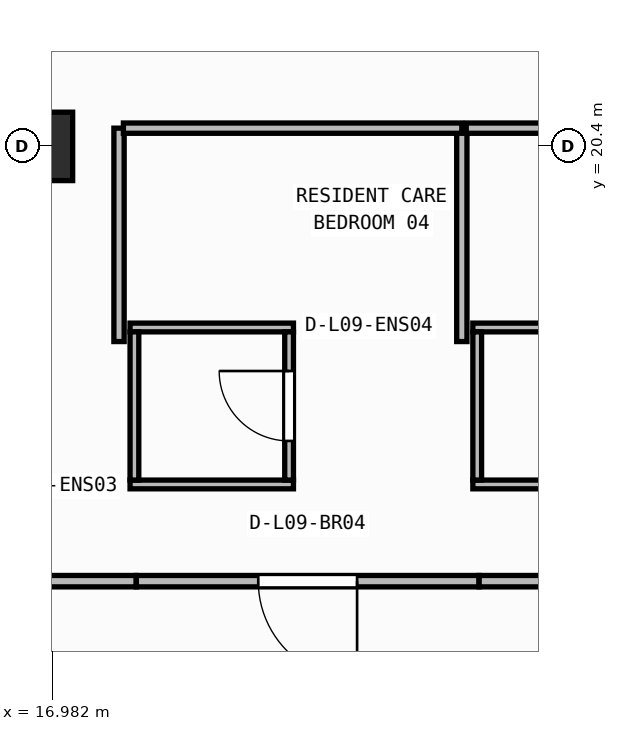
"""IFC4 building model, lengths in metres.
Left out: names, types, materials, properties, quantities, classifications, styles, units other than length and angle.
Written with IfcOpenShell. Run it as: python <this file> out.ifc"""

import sys

from ifc_helpers import new_model, si_unit, direction, frame, frame_2d, origin, origin_2d, place, context, subcontext, project, spatial, rectangle, extrude, element, fill, save


model = new_model("IFC4")
c1 = context("Model", 3, precision=1e-05, world=origin(), true_north=direction((0.0, 1.0)))
c2 = subcontext(c1, "Body", "Model", "MODEL_VIEW")
j1 = project(units=[si_unit("LENGTHUNIT", "METRE"), si_unit("PLANEANGLEUNIT", "RADIAN")], contexts=[c1])
p1 = place(None, origin())
s1 = spatial("IfcSite", under=j1, at=p1, CompositionType="ELEMENT")
p2 = place(p1, origin())
s2 = spatial("IfcBuilding", under=s1, at=p2, CompositionType="ELEMENT")
p3 = place(p2, frame((0.0, 0.0, 38.3)))
s3 = spatial("IfcBuildingStorey", under=s2, at=p3, CompositionType="ELEMENT", Elevation=38.3)
p4 = place(p3, frame((16.8, 20.4, 0.0), z_axis=(0.0, 0.0, 1.0), x_axis=(1.0, 0.0, 0.0)))
e1 = element("IfcColumn", 1, at=p4, inside=s3, PredefinedType="COLUMN", context=c2, shape_type="SweptSolid", body=[
    extrude(rectangle(XDim=0.9, YDim=0.9, at=origin_2d()), origin(), (0.0, 0.0, 1.0), 3.95),
])
for number, where, z_axis, x_axis in (
    (2, (18.005, 15.952, 0.0), (0.0, 0.0, 1.0), (1.0, 0.0, 0.0)),
    (3, (18.005, 18.018, 0.0), (0.0, 0.0, 1.0), (1.0, 0.0, 0.0)),
):
    element("IfcWall", number, at=place(p3, frame(where, z_axis=z_axis, x_axis=x_axis)), inside=s3, PredefinedType="PARTITIONING", context=c2, shape_type="SweptSolid", body=[
        extrude(rectangle(XDim=2.15, YDim=0.115, at=frame_2d((1.075, 0.0))), origin(), (0.0, 0.0, 1.0), 3.71),
    ])
p5 = place(p3, frame((18.062, 16.01, 0.0), z_axis=(0.0, 0.0, 1.0), x_axis=(0.0, 1.0, 0.0)))
e4 = element("IfcWall", 4, at=p5, inside=s3, PredefinedType="PARTITIONING", context=c2, shape_type="SweptSolid", body=[
    extrude(rectangle(XDim=1.95, YDim=0.115, at=frame_2d((0.975, 0.0))), origin(), (0.0, 0.0, 1.0), 3.71),
])
p6 = place(p3, frame((20.097, 16.01, 0.0), z_axis=(0.0, 0.0, 1.0), x_axis=(0.0, 1.0, 0.0)))
e5 = element("IfcWall", 5, at=p6, inside=s3, PredefinedType="PARTITIONING", context=c2, shape_type="SweptSolid", body=[
    extrude(rectangle(XDim=1.95, YDim=0.115, at=frame_2d((0.975, 0.0))), origin(), (0.0, 0.0, 1.0), 3.71),
])
p7 = place(p6, frame((0.515, 0.0, 0.0)))
e6 = element("IfcOpeningElement", 6, at=p7, cuts=e5, PredefinedType="OPENING", context=c2, shape_type="SweptSolid", body=[
    extrude(rectangle(XDim=0.92, YDim=2.1, at=frame_2d((0.46, 1.05))), frame((0.0, 0.067, 0.0), z_axis=(0.0, -1.0, 0.0), x_axis=(1.0, 0.0, 0.0)), (0.0, 0.0, 1.0), 0.135),
])
for number, where, z_axis, x_axis in (
    (7, (22.515, 15.952, 0.0), (0.0, 0.0, 1.0), (1.0, 0.0, 0.0)),
    (8, (22.515, 18.018, 0.0), (0.0, 0.0, 1.0), (1.0, 0.0, 0.0)),
):
    element("IfcWall", number, at=place(p3, frame(where, z_axis=z_axis, x_axis=x_axis)), inside=s3, PredefinedType="PARTITIONING", context=c2, shape_type="SweptSolid", body=[
        extrude(rectangle(XDim=2.15, YDim=0.115, at=frame_2d((1.075, 0.0))), origin(), (0.0, 0.0, 1.0), 3.71),
    ])
p8 = place(p3, frame((22.573, 16.01, 0.0), z_axis=(0.0, 0.0, 1.0), x_axis=(0.0, 1.0, 0.0)))
e9 = element("IfcWall", 9, at=p8, inside=s3, PredefinedType="PARTITIONING", context=c2, shape_type="SweptSolid", body=[
    extrude(rectangle(XDim=1.95, YDim=0.115, at=frame_2d((0.975, 0.0))), origin(), (0.0, 0.0, 1.0), 3.71),
])
p9 = place(p3, frame((18.086, 14.68, 0.0), z_axis=(0.0, 0.0, 1.0), x_axis=(-1.0, 0.0, 0.0)))
e10 = element("IfcWall", 10, at=p9, inside=s3, PredefinedType="PARTITIONING", context=c2, shape_type="SweptSolid", body=[
    extrude(rectangle(XDim=4.148, YDim=0.15, at=frame_2d((2.074, 0.0))), origin(), (0.0, 0.0, 1.0), 3.71),
])
p10 = place(p9, frame((1.424, 0.0, 0.0)))
e11 = element("IfcOpeningElement", 11, at=p10, cuts=e10, PredefinedType="OPENING", context=c2, shape_type="SweptSolid", body=[
    extrude(rectangle(XDim=1.3, YDim=2.15, at=frame_2d((0.65, 1.075))), frame((0.0, 0.085, 0.0), z_axis=(0.0, -1.0, 0.0), x_axis=(1.0, 0.0, 0.0)), (0.0, 0.0, 1.0), 0.17),
])
p11 = place(p3, frame((22.596, 14.68, 0.0), z_axis=(0.0, 0.0, 1.0), x_axis=(-1.0, 0.0, 0.0)))
e12 = element("IfcWall", 12, at=p11, inside=s3, PredefinedType="PARTITIONING", context=c2, shape_type="SweptSolid", body=[
    extrude(rectangle(XDim=4.508, YDim=0.15, at=frame_2d((2.254, 0.0))), origin(), (0.0, 0.0, 1.0), 3.71),
])
p12 = place(p11, frame((1.604, 0.0, 0.0)))
e13 = element("IfcOpeningElement", 13, at=p12, cuts=e12, PredefinedType="OPENING", context=c2, shape_type="SweptSolid", body=[
    extrude(rectangle(XDim=1.3, YDim=2.15, at=frame_2d((0.65, 1.075))), frame((0.0, 0.085, 0.0), z_axis=(0.0, -1.0, 0.0), x_axis=(1.0, 0.0, 0.0)), (0.0, 0.0, 1.0), 0.17),
])
p13 = place(p3, frame((27.546, 14.68, 0.0), z_axis=(0.0, 0.0, 1.0), x_axis=(-1.0, 0.0, 0.0)))
e14 = element("IfcWall", 14, at=p13, inside=s3, PredefinedType="PARTITIONING", context=c2, shape_type="SweptSolid", body=[
    extrude(rectangle(XDim=4.948, YDim=0.15, at=frame_2d((2.474, 0.0))), origin(), (0.0, 0.0, 1.0), 3.71),
])
p14 = place(p13, frame((1.824, 0.0, 0.0)))
e15 = element("IfcOpeningElement", 15, at=p14, cuts=e14, PredefinedType="OPENING", context=c2, shape_type="SweptSolid", body=[
    extrude(rectangle(XDim=1.3, YDim=2.15, at=frame_2d((0.65, 1.075))), frame((0.0, 0.085, 0.0), z_axis=(0.0, -1.0, 0.0), x_axis=(1.0, 0.0, 0.0)), (0.0, 0.0, 1.0), 0.17),
])
for number, where, z_axis, x_axis in (
    (16, (17.86, 17.833, 0.0), (0.0, 0.0, 1.0), (0.0, 1.0, 0.0)),
    (17, (22.37, 17.833, 0.0), (0.0, 0.0, 1.0), (0.0, 1.0, 0.0)),
):
    element("IfcWall", number, at=place(p3, frame(where, z_axis=z_axis, x_axis=x_axis)), inside=s3, PredefinedType="PARTITIONING", context=c2, shape_type="SweptSolid", body=[
        extrude(rectangle(XDim=2.807, YDim=0.135, at=frame_2d((1.404, 0.0))), origin(), (0.0, 0.0, 1.0), 3.71),
    ])
p15 = place(p3, frame((22.37, 20.64, 0.0), z_axis=(0.0, 0.0, 1.0), x_axis=(-1.0, 0.0, 0.0)))
e18 = element("IfcWall", 18, at=p15, inside=s3, PredefinedType="PARTITIONING", context=c2, shape_type="SweptSolid", body=[
    extrude(rectangle(XDim=4.453, YDim=0.135, at=frame_2d((2.226, 0.0))), origin(), (0.0, 0.0, 1.0), 3.073),
])
p16 = place(p3, frame((27.32, 20.64, 0.0), z_axis=(0.0, 0.0, 1.0), x_axis=(-1.0, 0.0, 0.0)))
e19 = element("IfcWall", 19, at=p16, inside=s3, PredefinedType="PARTITIONING", context=c2, shape_type="SweptSolid", body=[
    extrude(rectangle(XDim=4.893, YDim=0.135, at=frame_2d((2.446, 0.0))), origin(), (0.0, 0.0, 1.0), 3.073),
])
p17 = place(p7, origin())
e20 = element("IfcDoor", 20, at=p17, inside=s3, OperationType="SINGLE_SWING_RIGHT", PredefinedType="DOOR", context=c2, shape_type="SweptSolid", body=[
    extrude(rectangle(XDim=0.92, YDim=2.1, at=frame_2d((0.46, 1.05))), frame((0.0, 0.025, 0.0), z_axis=(0.0, -1.0, 0.0), x_axis=(1.0, 0.0, 0.0)), (0.0, 0.0, 1.0), 0.05),
])
fill(e6, e20)
p18 = place(p12, origin())
e21 = element("IfcDoor", 21, at=p18, inside=s3, OperationType="SINGLE_SWING_LEFT", PredefinedType="DOOR", context=c2, shape_type="SweptSolid", body=[
    extrude(rectangle(XDim=1.3, YDim=2.15, at=frame_2d((0.65, 1.075))), frame((0.0, 0.025, 0.0), z_axis=(0.0, -1.0, 0.0), x_axis=(1.0, 0.0, 0.0)), (0.0, 0.0, 1.0), 0.05),
])
fill(e13, e21)
save(model, sys.argv[1])
